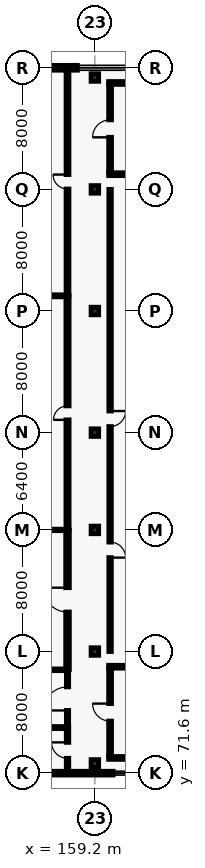
"""IFC4 building model, lengths in metres.
Left out: names, types, materials, properties, quantities, classifications, styles, units other than length and angle.
Written with IfcOpenShell. Run it as: python <this file> out.ifc"""

import sys

from ifc_helpers import new_model, si_unit, direction, frame, frame_2d, origin, origin_2d, place, context, subcontext, project, spatial, rectangle, extrude, element, fill, save


model = new_model("IFC4")
c1 = context("Model", 3, precision=1e-05, world=origin(), true_north=direction((0.0, 1.0)))
c2 = subcontext(c1, "Body", "Model", "MODEL_VIEW")
j1 = project(units=[si_unit("LENGTHUNIT", "METRE"), si_unit("PLANEANGLEUNIT", "RADIAN")], contexts=[c1])
p1 = place(None, origin())
s1 = spatial("IfcSite", under=j1, at=p1, CompositionType="ELEMENT")
p2 = place(p1, origin())
s2 = spatial("IfcBuilding", under=s1, at=p2, CompositionType="ELEMENT")
p3 = place(p2, frame((0.0, 0.0, 20.4)))
s3 = spatial("IfcBuildingStorey", under=s2, at=p3, CompositionType="ELEMENT", Elevation=20.4)
for number, where, z_axis, x_axis in (
    (1, (159.2, 72.24, 0.0), (0.0, 0.0, 1.0), (1.0, 0.0, 0.0)),
    (2, (159.2, 79.6, 0.0), (0.0, 0.0, 1.0), (1.0, 0.0, 0.0)),
    (3, (159.2, 87.6, 0.0), (0.0, 0.0, 1.0), (1.0, 0.0, 0.0)),
    (4, (159.2, 94.0, 0.0), (0.0, 0.0, 1.0), (1.0, 0.0, 0.0)),
    (5, (159.2, 102.0, 0.0), (0.0, 0.0, 1.0), (1.0, 0.0, 0.0)),
    (6, (159.2, 110.0, 0.0), (0.0, 0.0, 1.0), (1.0, 0.0, 0.0)),
    (7, (159.2, 117.36, 0.0), (0.0, 0.0, 1.0), (1.0, 0.0, 0.0)),
):
    element("IfcColumn", number, at=place(p3, frame(where, z_axis=z_axis, x_axis=x_axis)), inside=s3, PredefinedType="COLUMN", context=c2, shape_type="SweptSolid", body=[
        extrude(rectangle(XDim=0.5, YDim=0.5, at=origin_2d()), origin(), (0.0, 0.0, 1.0), 4.5),
    ])
p4 = place(p3, frame((146.2, 118.0, 0.0), z_axis=(0.0, 0.0, 1.0), x_axis=(1.0, 0.0, 0.0)))
e8 = element("IfcWall", 8, at=p4, inside=s3, PredefinedType="SOLIDWALL", context=c2, shape_type="SweptSolid", body=[
    extrude(rectangle(XDim=25.8, YDim=0.32, at=frame_2d((12.9, 0.0))), origin(), (0.0, 0.0, 1.0), 4.3),
])
p5 = place(p4, frame((2.2, 0.0, 0.9)))
e9 = element("IfcOpeningElement", 9, at=p5, cuts=e8, PredefinedType="OPENING", context=c2, shape_type="SweptSolid", body=[
    extrude(rectangle(XDim=3.1, YDim=2.45, at=frame_2d((1.55, 1.225))), frame((0.0, 0.17, 0.0), z_axis=(0.0, -1.0, 0.0), x_axis=(1.0, 0.0, 0.0)), (0.0, 0.0, 1.0), 0.34),
])
p6 = place(p4, frame((7.75, 0.0, 0.9)))
e10 = element("IfcOpeningElement", 10, at=p6, cuts=e8, PredefinedType="OPENING", context=c2, shape_type="SweptSolid", body=[
    extrude(rectangle(XDim=1.6, YDim=1.65, at=frame_2d((0.8, 0.825))), frame((0.0, 0.17, 0.0), z_axis=(0.0, -1.0, 0.0), x_axis=(1.0, 0.0, 0.0)), (0.0, 0.0, 1.0), 0.34),
])
p7 = place(p4, frame((11.85, 0.0, 0.9)))
e11 = element("IfcOpeningElement", 11, at=p7, cuts=e8, PredefinedType="OPENING", context=c2, shape_type="SweptSolid", body=[
    extrude(rectangle(XDim=3.3, YDim=2.5, at=frame_2d((1.65, 1.25))), frame((0.0, 0.17, 0.0), z_axis=(0.0, -1.0, 0.0), x_axis=(1.0, 0.0, 0.0)), (0.0, 0.0, 1.0), 0.34),
])
p8 = place(p3, frame((172.0, 71.6, 0.0), z_axis=(0.0, 0.0, 1.0), x_axis=(-1.0, 0.0, 0.0)))
e12 = element("IfcWall", 12, at=p8, inside=s3, PredefinedType="SOLIDWALL", context=c2, shape_type="SweptSolid", body=[
    extrude(rectangle(XDim=19.2, YDim=0.25, at=frame_2d((9.6, 0.0))), origin(), (0.0, 0.0, 1.0), 4.3),
])
p9 = place(p8, frame((10.0, 0.0, 0.8)))
e13 = element("IfcOpeningElement", 13, at=p9, cuts=e12, PredefinedType="OPENING", context=c2, shape_type="SweptSolid", body=[
    extrude(rectangle(XDim=1.6, YDim=2.75, at=frame_2d((0.8, 1.375))), frame((0.0, 0.135, 0.0), z_axis=(0.0, -1.0, 0.0), x_axis=(1.0, 0.0, 0.0)), (0.0, 0.0, 1.0), 0.27),
])
p10 = place(p3, frame((160.105, 72.6, 0.0), z_axis=(0.0, 0.0, 1.0), x_axis=(1.0, 0.0, 0.0)))
e14 = element("IfcWall", 14, at=p10, inside=s3, PredefinedType="PARTITIONING", context=c2, shape_type="SweptSolid", body=[
    extrude(rectangle(XDim=4.495, YDim=0.19, at=frame_2d((2.248, 0.0))), origin(), (0.0, 0.0, 1.0), 3.65),
])
p11 = place(p3, frame((160.105, 78.6, 0.0), z_axis=(0.0, 0.0, 1.0), x_axis=(1.0, 0.0, 0.0)))
e15 = element("IfcWall", 15, at=p11, inside=s3, PredefinedType="PARTITIONING", context=c2, shape_type="SweptSolid", body=[
    extrude(rectangle(XDim=4.495, YDim=0.19, at=frame_2d((2.248, 0.0))), origin(), (0.0, 0.0, 1.0), 4.3),
])
p12 = place(p3, frame((160.2, 72.695, 0.0), z_axis=(0.0, 0.0, 1.0), x_axis=(0.0, 1.0, 0.0)))
e16 = element("IfcWall", 16, at=p12, inside=s3, PredefinedType="PARTITIONING", context=c2, shape_type="SweptSolid", body=[
    extrude(rectangle(XDim=5.81, YDim=0.19, at=frame_2d((2.905, 0.0))), origin(), (0.0, 0.0, 1.0), 4.3),
])
p13 = place(p12, frame((2.33, 0.0, 0.0)))
e17 = element("IfcOpeningElement", 17, at=p13, cuts=e16, PredefinedType="OPENING", context=c2, shape_type="SweptSolid", body=[
    extrude(rectangle(XDim=1.15, YDim=2.2, at=frame_2d((0.575, 1.1))), frame((0.0, 0.105, 0.0), z_axis=(0.0, -1.0, 0.0), x_axis=(1.0, 0.0, 0.0)), (0.0, 0.0, 1.0), 0.21),
])
p14 = place(p3, frame((160.105, 111.0, 0.0), z_axis=(0.0, 0.0, 1.0), x_axis=(1.0, 0.0, 0.0)))
e18 = element("IfcWall", 18, at=p14, inside=s3, PredefinedType="PARTITIONING", context=c2, shape_type="SweptSolid", body=[
    extrude(rectangle(XDim=4.495, YDim=0.19, at=frame_2d((2.248, 0.0))), origin(), (0.0, 0.0, 1.0), 4.3),
])
p15 = place(p3, frame((160.105, 117.0, 0.0), z_axis=(0.0, 0.0, 1.0), x_axis=(1.0, 0.0, 0.0)))
e19 = element("IfcWall", 19, at=p15, inside=s3, PredefinedType="PARTITIONING", context=c2, shape_type="SweptSolid", body=[
    extrude(rectangle(XDim=4.495, YDim=0.19, at=frame_2d((2.248, 0.0))), origin(), (0.0, 0.0, 1.0), 3.65),
])
p16 = place(p3, frame((160.2, 111.095, 0.0), z_axis=(0.0, 0.0, 1.0), x_axis=(0.0, 1.0, 0.0)))
e20 = element("IfcWall", 20, at=p16, inside=s3, PredefinedType="PARTITIONING", context=c2, shape_type="SweptSolid", body=[
    extrude(rectangle(XDim=5.81, YDim=0.19, at=frame_2d((2.905, 0.0))), origin(), (0.0, 0.0, 1.0), 4.3),
])
p17 = place(p16, frame((2.33, 0.0, 0.0)))
e21 = element("IfcOpeningElement", 21, at=p17, cuts=e20, PredefinedType="OPENING", context=c2, shape_type="SweptSolid", body=[
    extrude(rectangle(XDim=1.15, YDim=2.2, at=frame_2d((0.575, 1.1))), frame((0.0, 0.105, 0.0), z_axis=(0.0, -1.0, 0.0), x_axis=(1.0, 0.0, 0.0)), (0.0, 0.0, 1.0), 0.21),
])
p18 = place(p3, frame((157.4, 71.6, 0.0), z_axis=(0.0, 0.0, 1.0), x_axis=(0.0, 1.0, 0.0)))
e22 = element("IfcWall", 22, at=p18, inside=s3, PredefinedType="PARTITIONING", context=c2, shape_type="SweptSolid", body=[
    extrude(rectangle(XDim=3.0, YDim=0.165, at=frame_2d((1.5, 0.0))), origin(), (0.0, 0.0, 1.0), 4.3),
])
p19 = place(p18, frame((0.975, 0.0, 0.0)))
e23 = element("IfcOpeningElement", 23, at=p19, cuts=e22, PredefinedType="OPENING", context=c2, shape_type="SweptSolid", body=[
    extrude(rectangle(XDim=1.05, YDim=2.15, at=frame_2d((0.525, 1.075))), frame((0.0, 0.093, 0.0), z_axis=(0.0, -1.0, 0.0), x_axis=(1.0, 0.0, 0.0)), (0.0, 0.0, 1.0), 0.185),
])
p20 = place(p3, frame((157.4, 74.6, 0.0), z_axis=(0.0, 0.0, 1.0), x_axis=(0.0, 1.0, 0.0)))
e24 = element("IfcWall", 24, at=p20, inside=s3, PredefinedType="PARTITIONING", context=c2, shape_type="SweptSolid", body=[
    extrude(rectangle(XDim=3.8, YDim=0.15, at=frame_2d((1.9, 0.0))), origin(), (0.0, 0.0, 1.0), 4.3),
])
p21 = place(p20, frame((1.125, 0.0, 0.0)))
e25 = element("IfcOpeningElement", 25, at=p21, cuts=e24, PredefinedType="OPENING", context=c2, shape_type="SweptSolid", body=[
    extrude(rectangle(XDim=1.55, YDim=2.25, at=frame_2d((0.775, 1.125))), frame((0.0, 0.085, 0.0), z_axis=(0.0, -1.0, 0.0), x_axis=(1.0, 0.0, 0.0)), (0.0, 0.0, 1.0), 0.17),
])
p22 = place(p3, frame((157.4, 78.4, 0.0), z_axis=(0.0, 0.0, 1.0), x_axis=(0.0, 1.0, 0.0)))
e26 = element("IfcWall", 26, at=p22, inside=s3, PredefinedType="PARTITIONING", context=c2, shape_type="SweptSolid", body=[
    extrude(rectangle(XDim=9.2, YDim=0.24, at=frame_2d((4.6, 0.0))), origin(), (0.0, 0.0, 1.0), 4.3),
])
p23 = place(p22, frame((3.8, 0.0, 0.0)))
e27 = element("IfcOpeningElement", 27, at=p23, cuts=e26, PredefinedType="OPENING", context=c2, shape_type="SweptSolid", body=[
    extrude(rectangle(XDim=1.6, YDim=2.3, at=frame_2d((0.8, 1.15))), frame((0.0, 0.13, 0.0), z_axis=(0.0, -1.0, 0.0), x_axis=(1.0, 0.0, 0.0)), (0.0, 0.0, 1.0), 0.26),
])
p24 = place(p3, frame((157.4, 87.6, 0.0), z_axis=(0.0, 0.0, 1.0), x_axis=(0.0, 1.0, 0.0)))
e28 = element("IfcWall", 28, at=p24, inside=s3, PredefinedType="PARTITIONING", context=c2, shape_type="SweptSolid", body=[
    extrude(rectangle(XDim=15.4, YDim=0.21, at=frame_2d((7.7, 0.0))), origin(), (0.0, 0.0, 1.0), 4.3),
])
p25 = place(p24, frame((7.24, 0.0, 0.0)))
e29 = element("IfcOpeningElement", 29, at=p25, cuts=e28, PredefinedType="OPENING", context=c2, shape_type="SweptSolid", body=[
    extrude(rectangle(XDim=0.92, YDim=2.1, at=frame_2d((0.46, 1.05))), frame((0.0, 0.115, 0.0), z_axis=(0.0, -1.0, 0.0), x_axis=(1.0, 0.0, 0.0)), (0.0, 0.0, 1.0), 0.23),
])
p26 = place(p3, frame((157.4, 103.0, 0.0), z_axis=(0.0, 0.0, 1.0), x_axis=(0.0, 1.0, 0.0)))
e30 = element("IfcWall", 30, at=p26, inside=s3, PredefinedType="PARTITIONING", context=c2, shape_type="SweptSolid", body=[
    extrude(rectangle(XDim=15.0, YDim=0.19, at=frame_2d((7.5, 0.0))), origin(), (0.0, 0.0, 1.0), 4.3),
])
p27 = place(p26, frame((7.025, 0.0, 0.0)))
e31 = element("IfcOpeningElement", 31, at=p27, cuts=e30, PredefinedType="OPENING", context=c2, shape_type="SweptSolid", body=[
    extrude(rectangle(XDim=0.95, YDim=2.1, at=frame_2d((0.475, 1.05))), frame((0.0, 0.105, 0.0), z_axis=(0.0, -1.0, 0.0), x_axis=(1.0, 0.0, 0.0)), (0.0, 0.0, 1.0), 0.21),
])
p28 = place(p3, frame((160.2, 110.0, 0.0), z_axis=(0.0, 0.0, 1.0), x_axis=(0.0, -1.0, 0.0)))
e32 = element("IfcWall", 32, at=p28, inside=s3, PredefinedType="PARTITIONING", context=c2, shape_type="SweptSolid", body=[
    extrude(rectangle(XDim=30.4, YDim=0.165, at=frame_2d((15.2, 0.0))), origin(), (0.0, 0.0, 1.0), 4.3),
])
p29 = place(p28, frame((14.58, 0.0, 0.0)))
e33 = element("IfcOpeningElement", 33, at=p29, cuts=e32, PredefinedType="OPENING", context=c2, shape_type="SweptSolid", body=[
    extrude(rectangle(XDim=1.02, YDim=2.1, at=frame_2d((0.51, 1.05))), frame((0.0, 0.093, 0.0), z_axis=(0.0, -1.0, 0.0), x_axis=(1.0, 0.0, 0.0)), (0.0, 0.0, 1.0), 0.185),
])
p30 = place(p28, frame((23.202, 0.0, 0.0)))
e34 = element("IfcOpeningElement", 34, at=p30, cuts=e32, PredefinedType="OPENING", context=c2, shape_type="SweptSolid", body=[
    extrude(rectangle(XDim=1.02, YDim=2.1, at=frame_2d((0.51, 1.05))), frame((0.0, 0.093, 0.0), z_axis=(0.0, -1.0, 0.0), x_axis=(1.0, 0.0, 0.0)), (0.0, 0.0, 1.0), 0.185),
])
p31 = place(p3, frame((154.2, 74.6, 0.0), z_axis=(0.0, 0.0, 1.0), x_axis=(1.0, 0.0, 0.0)))
e35 = element("IfcWall", 35, at=p31, inside=s3, PredefinedType="PARTITIONING", context=c2, shape_type="SweptSolid", body=[
    extrude(rectangle(XDim=3.2, YDim=0.135, at=frame_2d((1.6, 0.0))), origin(), (0.0, 0.0, 1.0), 4.3),
])
p32 = place(p3, frame((152.8, 78.4, 0.0), z_axis=(0.0, 0.0, 1.0), x_axis=(1.0, 0.0, 0.0)))
e36 = element("IfcWall", 36, at=p32, inside=s3, PredefinedType="PARTITIONING", context=c2, shape_type="SweptSolid", body=[
    extrude(rectangle(XDim=4.6, YDim=0.115, at=frame_2d((2.3, 0.0))), origin(), (0.0, 0.0, 1.0), 4.3),
])
p33 = place(p3, frame((153.052, 87.6, 0.0), z_axis=(0.0, 0.0, 1.0), x_axis=(1.0, 0.0, 0.0)))
e37 = element("IfcWall", 37, at=p33, inside=s3, PredefinedType="PARTITIONING", context=c2, shape_type="SweptSolid", body=[
    extrude(rectangle(XDim=4.348, YDim=0.1, at=frame_2d((2.174, 0.0))), origin(), (0.0, 0.0, 1.0), 3.65),
])
p34 = place(p3, frame((146.2, 103.0, 0.0), z_axis=(0.0, 0.0, 1.0), x_axis=(1.0, 0.0, 0.0)))
e38 = element("IfcWall", 38, at=p34, inside=s3, PredefinedType="PARTITIONING", context=c2, shape_type="SweptSolid", body=[
    extrude(rectangle(XDim=11.2, YDim=0.135, at=frame_2d((5.6, 0.0))), origin(), (0.0, 0.0, 1.0), 4.3),
])
p35 = place(p7, origin())
e39 = element("IfcWindow", 39, at=p35, inside=s3, PartitioningType="SINGLE_PANEL", PredefinedType="WINDOW", context=c2, shape_type="SweptSolid", body=[
    extrude(rectangle(XDim=3.3, YDim=2.5, at=frame_2d((1.65, 1.25))), frame((0.0, 0.03, 0.0), z_axis=(0.0, -1.0, 0.0), x_axis=(1.0, 0.0, 0.0)), (0.0, 0.0, 1.0), 0.06),
])
fill(e11, e39)
p36 = place(p9, origin())
e40 = element("IfcWindow", 40, at=p36, inside=s3, PartitioningType="SINGLE_PANEL", PredefinedType="WINDOW", context=c2, shape_type="SweptSolid", body=[
    extrude(rectangle(XDim=1.6, YDim=2.75, at=frame_2d((0.8, 1.375))), frame((0.0, 0.03, 0.0), z_axis=(0.0, -1.0, 0.0), x_axis=(1.0, 0.0, 0.0)), (0.0, 0.0, 1.0), 0.06),
])
fill(e13, e40)
p37 = place(p13, origin())
e41 = element("IfcDoor", 41, at=p37, inside=s3, OperationType="SINGLE_SWING_RIGHT", PredefinedType="DOOR", context=c2, shape_type="SweptSolid", body=[
    extrude(rectangle(XDim=1.15, YDim=2.2, at=frame_2d((0.575, 1.1))), frame((0.0, 0.025, 0.0), z_axis=(0.0, -1.0, 0.0), x_axis=(1.0, 0.0, 0.0)), (0.0, 0.0, 1.0), 0.05),
])
fill(e17, e41)
p38 = place(p17, origin())
e42 = element("IfcDoor", 42, at=p38, inside=s3, OperationType="SINGLE_SWING_LEFT", PredefinedType="DOOR", context=c2, shape_type="SweptSolid", body=[
    extrude(rectangle(XDim=1.15, YDim=2.2, at=frame_2d((0.575, 1.1))), frame((0.0, 0.025, 0.0), z_axis=(0.0, -1.0, 0.0), x_axis=(1.0, 0.0, 0.0)), (0.0, 0.0, 1.0), 0.05),
])
fill(e21, e42)
p39 = place(p19, origin())
e43 = element("IfcDoor", 43, at=p39, inside=s3, OperationType="SINGLE_SWING_RIGHT", PredefinedType="DOOR", context=c2, shape_type="SweptSolid", body=[
    extrude(rectangle(XDim=1.05, YDim=2.15, at=frame_2d((0.525, 1.075))), frame((0.0, 0.025, 0.0), z_axis=(0.0, -1.0, 0.0), x_axis=(1.0, 0.0, 0.0)), (0.0, 0.0, 1.0), 0.05),
])
fill(e23, e43)
p40 = place(p21, origin())
e44 = element("IfcDoor", 44, at=p40, inside=s3, OperationType="SINGLE_SWING_LEFT", PredefinedType="DOOR", context=c2, shape_type="SweptSolid", body=[
    extrude(rectangle(XDim=1.55, YDim=2.25, at=frame_2d((0.775, 1.125))), frame((0.0, 0.025, 0.0), z_axis=(0.0, -1.0, 0.0), x_axis=(1.0, 0.0, 0.0)), (0.0, 0.0, 1.0), 0.05),
])
fill(e25, e44)
p41 = place(p23, origin())
e45 = element("IfcDoor", 45, at=p41, inside=s3, OperationType="SINGLE_SWING_RIGHT", PredefinedType="DOOR", context=c2, shape_type="SweptSolid", body=[
    extrude(rectangle(XDim=1.6, YDim=2.3, at=frame_2d((0.8, 1.15))), frame((0.0, 0.025, 0.0), z_axis=(0.0, -1.0, 0.0), x_axis=(1.0, 0.0, 0.0)), (0.0, 0.0, 1.0), 0.05),
])
fill(e27, e45)
p42 = place(p25, origin())
e46 = element("IfcDoor", 46, at=p42, inside=s3, OperationType="SINGLE_SWING_LEFT", PredefinedType="DOOR", context=c2, shape_type="SweptSolid", body=[
    extrude(rectangle(XDim=0.92, YDim=2.1, at=frame_2d((0.46, 1.05))), frame((0.0, 0.025, 0.0), z_axis=(0.0, -1.0, 0.0), x_axis=(1.0, 0.0, 0.0)), (0.0, 0.0, 1.0), 0.05),
])
fill(e29, e46)
p43 = place(p27, origin())
e47 = element("IfcDoor", 47, at=p43, inside=s3, OperationType="SINGLE_SWING_RIGHT", PredefinedType="DOOR", context=c2, shape_type="SweptSolid", body=[
    extrude(rectangle(XDim=0.95, YDim=2.1, at=frame_2d((0.475, 1.05))), frame((0.0, 0.025, 0.0), z_axis=(0.0, -1.0, 0.0), x_axis=(1.0, 0.0, 0.0)), (0.0, 0.0, 1.0), 0.05),
])
fill(e31, e47)
p44 = place(p29, origin())
e48 = element("IfcDoor", 48, at=p44, inside=s3, OperationType="SINGLE_SWING_LEFT", PredefinedType="DOOR", context=c2, shape_type="SweptSolid", body=[
    extrude(rectangle(XDim=1.02, YDim=2.1, at=frame_2d((0.51, 1.05))), frame((0.0, 0.025, 0.0), z_axis=(0.0, -1.0, 0.0), x_axis=(1.0, 0.0, 0.0)), (0.0, 0.0, 1.0), 0.05),
])
fill(e33, e48)
p45 = place(p30, origin())
e49 = element("IfcDoor", 49, at=p45, inside=s3, OperationType="SINGLE_SWING_RIGHT", PredefinedType="DOOR", context=c2, shape_type="SweptSolid", body=[
    extrude(rectangle(XDim=1.02, YDim=2.1, at=frame_2d((0.51, 1.05))), frame((0.0, 0.025, 0.0), z_axis=(0.0, -1.0, 0.0), x_axis=(1.0, 0.0, 0.0)), (0.0, 0.0, 1.0), 0.05),
])
fill(e34, e49)
save(model, sys.argv[1])
